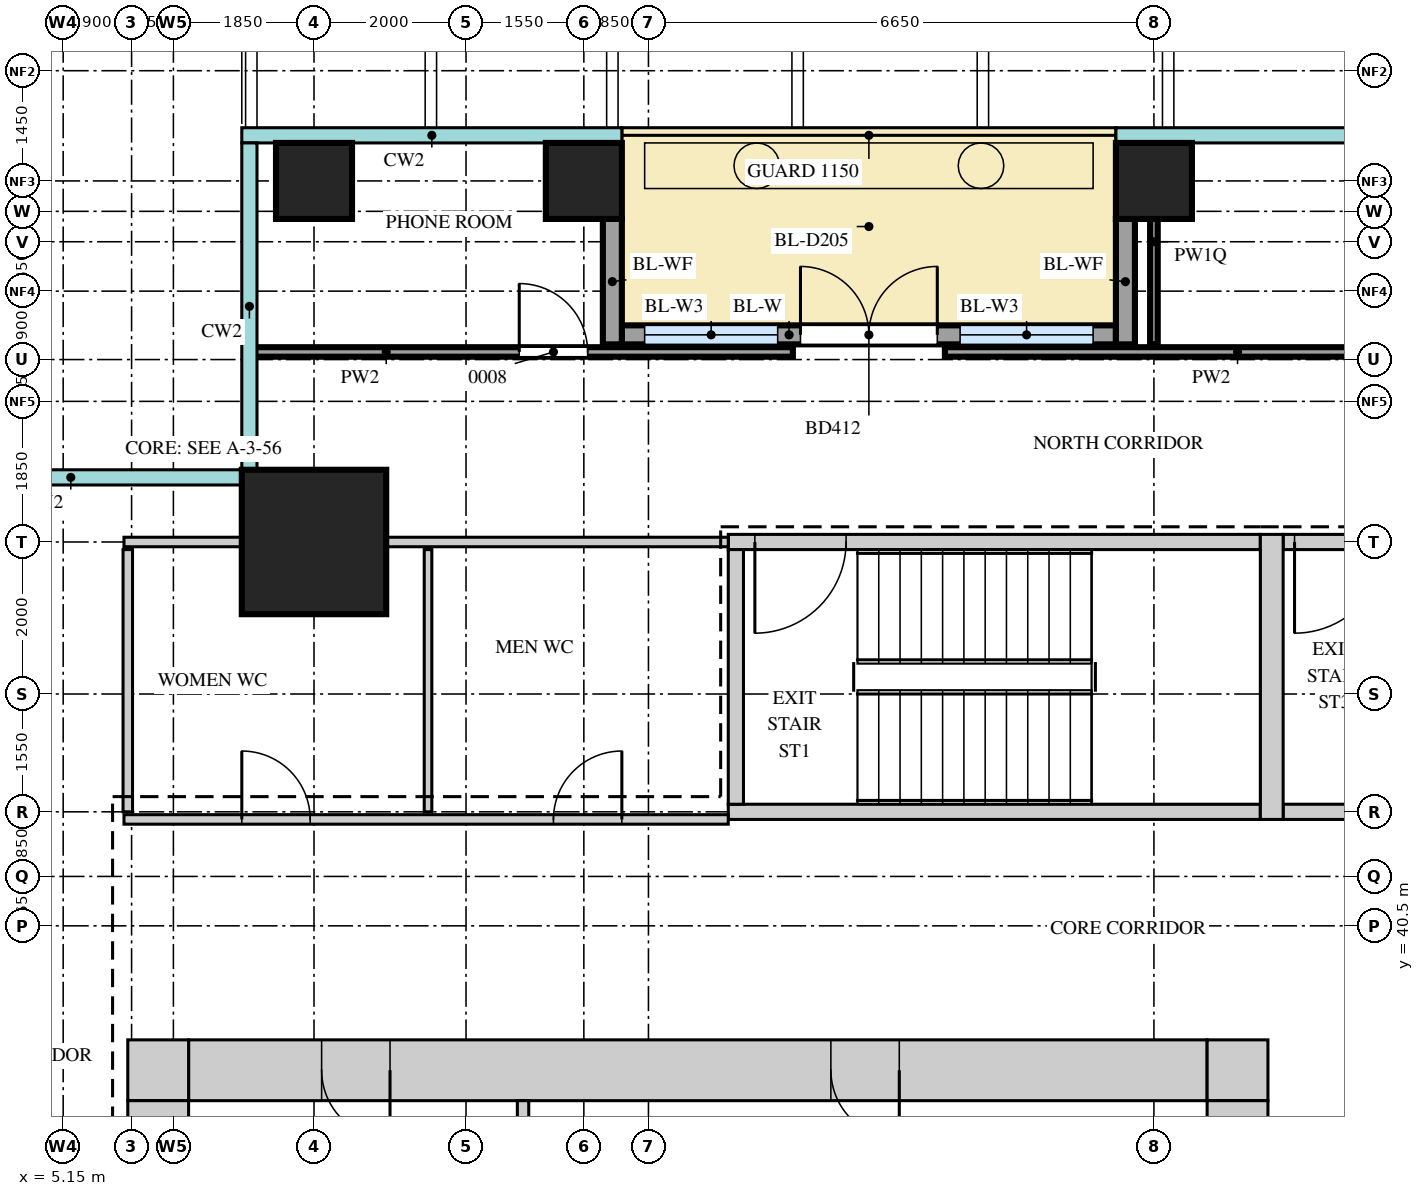
"""IFC4 building model, lengths in metres.
Left out: names, types, materials, properties, quantities, classifications, styles, units other than length and angle.
Written with IfcOpenShell. Run it as: python <this file> out.ifc"""

import sys

from ifc_helpers import new_model, si_unit, direction, frame, frame_2d, origin, origin_2d, place, context, subcontext, project, spatial, rectangle, extrude, source, transform, mapped, element, fill, save


model = new_model("IFC4")
c1 = context("Model", 3, precision=1e-05, world=origin(), true_north=direction((0.0, 1.0)))
c2 = subcontext(c1, "Body", "Model", "MODEL_VIEW")
j1 = project(units=[si_unit("LENGTHUNIT", "METRE"), si_unit("PLANEANGLEUNIT", "RADIAN")], contexts=[c1])
p1 = place(None, origin())
s1 = spatial("IfcSite", under=j1, at=p1, CompositionType="ELEMENT")
p2 = place(p1, origin())
s2 = spatial("IfcBuilding", under=s1, at=p2, CompositionType="ELEMENT")
p3 = place(p2, frame((0.0, 0.0, 188.7)))
s3 = spatial("IfcBuildingStorey", under=s2, at=p3, CompositionType="ELEMENT", Elevation=188.7)
m1 = source(origin(), c2, "Body", "SweptSolid", [
    extrude(rectangle(XDim=13.4, YDim=0.8, at=frame_2d((6.7, 0.0))), origin(), (0.0, 0.0, 1.0), 3.75),
])
p4 = place(p3, frame((6.8, 38.6, 0.0), z_axis=(0.0, 0.0, 1.0), x_axis=(1.0, 0.0, 0.0)))
e1 = element("IfcWall", 1, at=p4, inside=s3, PredefinedType="SHEAR", context=c2, shape_type="MappedRepresentation", body=[
    mapped(m1, transform((0.0, 0.0, 0.0))),
])
m2 = source(origin(), c2, "Body", "SweptSolid", [
    extrude(rectangle(XDim=0.9, YDim=2.1, at=frame_2d((0.45, 1.05))), frame((0.0, 0.41, 0.0), z_axis=(0.0, -1.0, 0.0), x_axis=(1.0, 0.0, 0.0)), (0.0, 0.0, 1.0), 0.82),
])
p5 = place(p4, frame((1.75, 0.0, 0.0)))
e2 = element("IfcOpeningElement", 2, at=p5, cuts=e1, PredefinedType="OPENING", context=c2, shape_type="MappedRepresentation", body=[
    mapped(m2, transform((0.0, 0.0, 0.0))),
])
p6 = place(p4, frame((8.45, 0.0, 0.0)))
e3 = element("IfcOpeningElement", 3, at=p6, cuts=e1, PredefinedType="OPENING", context=c2, shape_type="MappedRepresentation", body=[
    mapped(m2, transform((0.0, 0.0, 0.0))),
])
m3 = source(origin(), c2, "Body", "SweptSolid", [
    extrude(rectangle(XDim=0.8, YDim=0.8, at=frame_2d((0.4, 0.0))), origin(), (0.0, 0.0, 1.0), 3.75),
])
for number, where, z_axis, x_axis in (
    (4, (20.2, 38.6, 0.0), (0.0, 0.0, 1.0), (1.0, 0.0, 0.0)),
    (5, (6.0, 38.6, 0.0), (0.0, 0.0, 1.0), (1.0, 0.0, 0.0)),
):
    element("IfcWall", number, at=place(p3, frame(where, z_axis=z_axis, x_axis=x_axis)), inside=s3, PredefinedType="SHEAR", context=c2, shape_type="MappedRepresentation", body=[
        mapped(m3, transform((0.0, 0.0, 0.0))),
    ])
m4 = source(origin(), c2, "Body", "SweptSolid", [
    extrude(rectangle(XDim=22.4, YDim=0.8, at=frame_2d((11.2, 0.0))), origin(), (0.0, 0.0, 1.0), 3.75),
])
p7 = place(p3, frame((20.6, 15.8, 0.0), z_axis=(0.0, 0.0, 1.0), x_axis=(0.0, 1.0, 0.0)))
e6 = element("IfcWall", 6, at=p7, inside=s3, PredefinedType="SHEAR", context=c2, shape_type="MappedRepresentation", body=[
    mapped(m4, transform((0.0, 0.0, 0.0))),
])
m5 = source(origin(), c2, "Body", "SweptSolid", [
    extrude(rectangle(XDim=1.8, YDim=2.1, at=frame_2d((0.9, 1.05))), frame((0.0, 0.41, 0.0), z_axis=(0.0, -1.0, 0.0), x_axis=(1.0, 0.0, 0.0)), (0.0, 0.0, 1.0), 0.82),
])
p8 = place(p7, frame((10.7, 0.0, 0.0)))
e7 = element("IfcOpeningElement", 7, at=p8, cuts=e6, PredefinedType="OPENING", context=c2, shape_type="MappedRepresentation", body=[
    mapped(m5, transform((0.0, 0.0, 0.0))),
])
p9 = place(p7, frame((0.35, 0.0, 0.0)))
e8 = element("IfcOpeningElement", 8, at=p9, cuts=e6, PredefinedType="OPENING", context=c2, shape_type="MappedRepresentation", body=[
    mapped(m2, transform((0.0, 0.0, 0.0))),
])
p10 = place(p7, frame((2.15, 0.0, 0.0)))
e9 = element("IfcOpeningElement", 9, at=p10, cuts=e6, PredefinedType="OPENING", context=c2, shape_type="MappedRepresentation", body=[
    mapped(m2, transform((0.0, 0.0, 0.0))),
])
m6 = source(origin(), c2, "Body", "SweptSolid", [
    extrude(rectangle(XDim=1.0, YDim=2.1, at=frame_2d((0.5, 1.05))), frame((0.0, 0.41, 0.0), z_axis=(0.0, -1.0, 0.0), x_axis=(1.0, 0.0, 0.0)), (0.0, 0.0, 1.0), 0.82),
])
p11 = place(p7, frame((4.85, 0.0, 0.0)))
e10 = element("IfcOpeningElement", 10, at=p11, cuts=e6, PredefinedType="OPENING", context=c2, shape_type="MappedRepresentation", body=[
    mapped(m6, transform((0.0, 0.0, 0.0))),
])
p12 = place(p3, frame((6.4, 15.8, 0.0), z_axis=(0.0, 0.0, 1.0), x_axis=(0.0, 1.0, 0.0)))
e11 = element("IfcWall", 11, at=p12, inside=s3, PredefinedType="SHEAR", context=c2, shape_type="MappedRepresentation", body=[
    mapped(m4, transform((0.0, 0.0, 0.0))),
])
m7 = source(origin(), c2, "Body", "SweptSolid", [
    extrude(rectangle(XDim=7.0, YDim=0.2, at=frame_2d((3.5, 0.0))), origin(), (0.0, 0.0, 1.0), 3.75),
])
p13 = place(p3, frame((13.9, 45.55, 0.0), z_axis=(0.0, 0.0, 1.0), x_axis=(1.0, 0.0, 0.0)))
e12 = element("IfcWall", 12, at=p13, inside=s3, PredefinedType="SHEAR", context=c2, shape_type="MappedRepresentation", body=[
    mapped(m7, transform((0.0, 0.0, 0.0))),
])
m8 = source(origin(), c2, "Body", "SweptSolid", [
    extrude(rectangle(XDim=1.2, YDim=2.1, at=frame_2d((0.6, 1.05))), frame((0.0, 0.11, 0.0), z_axis=(0.0, -1.0, 0.0), x_axis=(1.0, 0.0, 0.0)), (0.0, 0.0, 1.0), 0.22),
])
p14 = place(p13, frame((0.35, 0.0, 0.0)))
e13 = element("IfcOpeningElement", 13, at=p14, cuts=e12, PredefinedType="OPENING", context=c2, shape_type="MappedRepresentation", body=[
    mapped(m8, transform((0.0, 0.0, 0.0))),
])
p15 = place(p3, frame((13.9, 42.0, 0.0), z_axis=(0.0, 0.0, 1.0), x_axis=(1.0, 0.0, 0.0)))
e14 = element("IfcWall", 14, at=p15, inside=s3, PredefinedType="SHEAR", context=c2, shape_type="MappedRepresentation", body=[
    mapped(m7, transform((0.0, 0.0, 0.0))),
])
m9 = source(origin(), c2, "Body", "SweptSolid", [
    extrude(rectangle(XDim=7.1, YDim=0.2, at=frame_2d((3.55, 0.0))), origin(), (0.0, 0.0, 1.0), 3.75),
])
p16 = place(p3, frame((21.2, 45.55, 0.0), z_axis=(0.0, 0.0, 1.0), x_axis=(1.0, 0.0, 0.0)))
e15 = element("IfcWall", 15, at=p16, inside=s3, PredefinedType="SHEAR", context=c2, shape_type="MappedRepresentation", body=[
    mapped(m9, transform((0.0, 0.0, 0.0))),
])
p17 = place(p16, frame((0.15, 0.0, 0.0)))
e16 = element("IfcOpeningElement", 16, at=p17, cuts=e15, PredefinedType="OPENING", context=c2, shape_type="MappedRepresentation", body=[
    mapped(m8, transform((0.0, 0.0, 0.0))),
])
p18 = place(p3, frame((21.2, 42.0, 0.0), z_axis=(0.0, 0.0, 1.0), x_axis=(1.0, 0.0, 0.0)))
e17 = element("IfcWall", 17, at=p18, inside=s3, PredefinedType="SHEAR", context=c2, shape_type="MappedRepresentation", body=[
    mapped(m9, transform((0.0, 0.0, 0.0))),
])
m10 = source(origin(), c2, "Body", "SweptSolid", [
    extrude(rectangle(XDim=3.75, YDim=0.3, at=frame_2d((1.875, 0.0))), origin(), (0.0, 0.0, 1.0), 3.75),
])
p19 = place(p3, frame((21.05, 41.9, 0.0), z_axis=(0.0, 0.0, 1.0), x_axis=(0.0, 1.0, 0.0)))
e18 = element("IfcWall", 18, at=p19, inside=s3, PredefinedType="SHEAR", context=c2, shape_type="MappedRepresentation", body=[
    mapped(m10, transform((0.0, 0.0, 0.0))),
])
m11 = source(origin(), c2, "Body", "SweptSolid", [
    extrude(rectangle(XDim=3.35, YDim=0.2, at=frame_2d((1.675, 0.0))), origin(), (0.0, 0.0, 1.0), 3.75),
])
p20 = place(p3, frame((14.0, 42.1, 0.0), z_axis=(0.0, 0.0, 1.0), x_axis=(0.0, 1.0, 0.0)))
e19 = element("IfcWall", 19, at=p20, inside=s3, PredefinedType="SHEAR", context=c2, shape_type="MappedRepresentation", body=[
    mapped(m11, transform((0.0, 0.0, 0.0))),
])
m12 = source(origin(), c2, "Body", "SweptSolid", [
    extrude(rectangle(XDim=1.9, YDim=1.9, at=origin_2d()), origin(), (0.0, 0.0, 1.0), 4.0),
])
p21 = place(p3, frame((8.45, 45.55, 0.0), z_axis=(0.0, 0.0, 1.0), x_axis=(1.0, 0.0, 0.0)))
e20 = element("IfcColumn", 20, at=p21, inside=s3, PredefinedType="COLUMN", context=c2, shape_type="MappedRepresentation", body=[
    mapped(m12, transform((0.0, 0.0, 0.0))),
])
m13 = source(origin(), c2, "Body", "SweptSolid", [
    extrude(rectangle(XDim=1.0, YDim=1.0, at=origin_2d()), origin(), (0.0, 0.0, 1.0), 3.75),
])
for number, where, z_axis, x_axis in (
    (21, (8.45, 50.3, 0.0), (0.0, 0.0, 1.0), (1.0, 0.0, 0.0)),
    (22, (12.0, 50.3, 0.0), (0.0, 0.0, 1.0), (1.0, 0.0, 0.0)),
    (23, (19.5, 50.3, 0.0), (0.0, 0.0, 1.0), (1.0, 0.0, 0.0)),
):
    element("IfcColumn", number, at=place(p3, frame(where, z_axis=z_axis, x_axis=x_axis)), inside=s3, PredefinedType="COLUMN", context=c2, shape_type="MappedRepresentation", body=[
        mapped(m13, transform((0.0, 0.0, 0.0))),
    ])
m14 = source(origin(), c2, "Body", "SweptSolid", [
    extrude(rectangle(XDim=6.5, YDim=0.25, at=frame_2d((3.25, 0.0))), origin(), (0.0, 0.0, 1.0), 3.75),
])
p22 = place(p3, frame((12.5, 48.275, 0.0), z_axis=(0.0, 0.0, 1.0), x_axis=(1.0, 0.0, 0.0)))
e24 = element("IfcWall", 24, at=p22, inside=s3, PredefinedType="SOLIDWALL", context=c2, shape_type="MappedRepresentation", body=[
    mapped(m14, transform((0.0, 0.0, 0.0))),
])
m15 = source(origin(), c2, "Body", "SweptSolid", [
    extrude(rectangle(XDim=1.75, YDim=2.4, at=frame_2d((0.875, 1.2))), frame((0.0, 0.135, 0.0), z_axis=(0.0, -1.0, 0.0), x_axis=(1.0, 0.0, 0.0)), (0.0, 0.0, 1.0), 0.27),
])
p23 = place(p22, frame((0.3, 0.0, 0.0)))
e25 = element("IfcOpeningElement", 25, at=p23, cuts=e24, PredefinedType="OPENING", context=c2, shape_type="MappedRepresentation", body=[
    mapped(m15, transform((0.0, 0.0, 0.0))),
])
p24 = place(p22, frame((4.45, 0.0, 0.0)))
e26 = element("IfcOpeningElement", 26, at=p24, cuts=e24, PredefinedType="OPENING", context=c2, shape_type="MappedRepresentation", body=[
    mapped(m15, transform((0.0, 0.0, 0.0))),
])
m16 = source(origin(), c2, "Body", "SweptSolid", [
    extrude(rectangle(XDim=1.8, YDim=2.4, at=frame_2d((0.9, 1.2))), frame((0.0, 0.135, 0.0), z_axis=(0.0, -1.0, 0.0), x_axis=(1.0, 0.0, 0.0)), (0.0, 0.0, 1.0), 0.27),
])
p25 = place(p22, frame((2.35, 0.0, 0.0)))
e27 = element("IfcOpeningElement", 27, at=p25, cuts=e24, PredefinedType="OPENING", context=c2, shape_type="MappedRepresentation", body=[
    mapped(m16, transform((0.0, 0.0, 0.0))),
])
m17 = source(origin(), c2, "Body", "SweptSolid", [
    extrude(rectangle(XDim=1.65, YDim=0.25, at=frame_2d((0.825, 0.0))), origin(), (0.0, 0.0, 1.0), 3.45),
])
for number, where, z_axis, x_axis in (
    (28, (12.375, 49.8, 0.0), (0.0, 0.0, 1.0), (0.0, -1.0, 0.0)),
    (29, (19.125, 49.8, 0.0), (0.0, 0.0, 1.0), (0.0, -1.0, 0.0)),
):
    element("IfcWall", number, at=place(p3, frame(where, z_axis=z_axis, x_axis=x_axis)), inside=s3, PredefinedType="SOLIDWALL", context=c2, shape_type="MappedRepresentation", body=[
        mapped(m17, transform((0.0, 0.0, 0.0))),
    ])
m18 = source(origin(), c2, "Body", "SweptSolid", [
    extrude(rectangle(XDim=6.0, YDim=0.15, at=frame_2d((3.0, 0.0))), origin(), (0.0, 0.0, 1.0), 3.8),
])
p26 = place(p3, frame((11.2, 32.2, 0.0), z_axis=(0.0, 0.0, 1.0), x_axis=(0.0, 1.0, 0.0)))
e30 = element("IfcWall", 30, at=p26, inside=s3, PredefinedType="PARTITIONING", context=c2, shape_type="MappedRepresentation", body=[
    mapped(m18, transform((0.0, 0.0, 0.0))),
])
m19 = source(origin(), c2, "Body", "SweptSolid", [
    extrude(rectangle(XDim=7.95, YDim=0.125, at=frame_2d((3.975, 0.0))), origin(), (0.0, 0.0, 1.0), 3.8),
])
p27 = place(p3, frame((5.95, 41.9, 0.0), z_axis=(0.0, 0.0, 1.0), x_axis=(1.0, 0.0, 0.0)))
e31 = element("IfcWall", 31, at=p27, inside=s3, PredefinedType="PARTITIONING", context=c2, shape_type="MappedRepresentation", body=[
    mapped(m19, transform((0.0, 0.0, 0.0))),
])
m20 = source(origin(), c2, "Body", "SweptSolid", [
    extrude(rectangle(XDim=0.9, YDim=2.1, at=frame_2d((0.45, 1.05))), frame((0.0, 0.073, 0.0), z_axis=(0.0, -1.0, 0.0), x_axis=(1.0, 0.0, 0.0)), (0.0, 0.0, 1.0), 0.145),
])
p28 = place(p27, frame((1.55, 0.0, 0.0)))
e32 = element("IfcOpeningElement", 32, at=p28, cuts=e31, PredefinedType="OPENING", context=c2, shape_type="MappedRepresentation", body=[
    mapped(m20, transform((0.0, 0.0, 0.0))),
])
p29 = place(p27, frame((5.65, 0.0, 0.0)))
e33 = element("IfcOpeningElement", 33, at=p29, cuts=e31, PredefinedType="OPENING", context=c2, shape_type="MappedRepresentation", body=[
    mapped(m20, transform((0.0, 0.0, 0.0))),
])
m21 = source(origin(), c2, "Body", "SweptSolid", [
    extrude(rectangle(XDim=3.45, YDim=0.125, at=frame_2d((1.725, 0.0))), origin(), (0.0, 0.0, 1.0), 3.8),
])
p30 = place(p3, frame((6.0, 42.0, 0.0), z_axis=(0.0, 0.0, 1.0), x_axis=(0.0, 1.0, 0.0)))
e34 = element("IfcWall", 34, at=p30, inside=s3, PredefinedType="PARTITIONING", context=c2, shape_type="MappedRepresentation", body=[
    mapped(m21, transform((0.0, 0.0, 0.0))),
])
m22 = source(origin(), c2, "Body", "SweptSolid", [
    extrude(rectangle(XDim=3.45, YDim=0.1, at=frame_2d((1.725, 0.0))), origin(), (0.0, 0.0, 1.0), 3.8),
])
p31 = place(p3, frame((9.95, 42.0, 0.0), z_axis=(0.0, 0.0, 1.0), x_axis=(0.0, 1.0, 0.0)))
e35 = element("IfcWall", 35, at=p31, inside=s3, PredefinedType="PARTITIONING", context=c2, shape_type="MappedRepresentation", body=[
    mapped(m22, transform((0.0, 0.0, 0.0))),
])
m23 = source(origin(), c2, "Body", "SweptSolid", [
    extrude(rectangle(XDim=7.95, YDim=0.125, at=frame_2d((3.975, 0.0))), origin(), (0.0, 0.0, 1.0), 3.25),
])
p32 = place(p3, frame((5.95, 45.55, 0.0), z_axis=(0.0, 0.0, 1.0), x_axis=(1.0, 0.0, 0.0)))
e36 = element("IfcWall", 36, at=p32, inside=s3, PredefinedType="PARTITIONING", context=c2, shape_type="MappedRepresentation", body=[
    mapped(m23, transform((0.0, 0.0, 0.0))),
])
m24 = source(origin(), c2, "Body", "SweptSolid", [
    extrude(rectangle(XDim=2.7, YDim=0.1, at=frame_2d((1.35, 0.0))), origin(), (0.0, 0.0, 1.0), 3.42),
])
p33 = place(p3, frame((19.5, 48.15, 0.0), z_axis=(0.0, 0.0, 1.0), x_axis=(0.0, 1.0, 0.0)))
e37 = element("IfcWall", 37, at=p33, inside=s3, PredefinedType="PARTITIONING", context=c2, shape_type="MappedRepresentation", body=[
    mapped(m24, transform((0.0, 0.0, 0.0))),
])
m25 = source(origin(), c2, "Body", "SweptSolid", [
    extrude(rectangle(XDim=7.1, YDim=0.125, at=frame_2d((3.55, 0.0))), origin(), (0.0, 0.0, 1.0), 3.8),
])
p34 = place(p3, frame((7.65, 48.05, 0.0), z_axis=(0.0, 0.0, 1.0), x_axis=(1.0, 0.0, 0.0)))
e38 = element("IfcWall", 38, at=p34, inside=s3, PredefinedType="PARTITIONING", context=c2, shape_type="MappedRepresentation", body=[
    mapped(m25, transform((0.0, 0.0, 0.0))),
])
p35 = place(p34, frame((3.5, 0.0, 0.0)))
e39 = element("IfcOpeningElement", 39, at=p35, cuts=e38, PredefinedType="OPENING", context=c2, shape_type="MappedRepresentation", body=[
    mapped(m20, transform((0.0, 0.0, 0.0))),
])
m26 = source(origin(), c2, "Body", "SweptSolid", [
    extrude(rectangle(XDim=13.9, YDim=0.125, at=frame_2d((6.95, 0.0))), origin(), (0.0, 0.0, 1.0), 3.8),
])
p36 = place(p3, frame((16.75, 48.05, 0.0), z_axis=(0.0, 0.0, 1.0), x_axis=(1.0, 0.0, 0.0)))
e40 = element("IfcWall", 40, at=p36, inside=s3, PredefinedType="PARTITIONING", context=c2, shape_type="MappedRepresentation", body=[
    mapped(m26, transform((0.0, 0.0, 0.0))),
])
p37 = place(p36, frame((7.7, 0.0, 0.0)))
e41 = element("IfcOpeningElement", 41, at=p37, cuts=e40, PredefinedType="OPENING", context=c2, shape_type="MappedRepresentation", body=[
    mapped(m20, transform((0.0, 0.0, 0.0))),
])
m27 = source(origin(), c2, "Body", "SweptSolid", [
    extrude(rectangle(XDim=1.75, YDim=2.4, at=frame_2d((0.875, 1.2))), frame((0.0, 0.03, 0.0), z_axis=(0.0, -1.0, 0.0), x_axis=(1.0, 0.0, 0.0)), (0.0, 0.0, 1.0), 0.06),
])
p38 = place(p23, origin())
e42 = element("IfcWindow", 42, at=p38, inside=s3, PartitioningType="SINGLE_PANEL", PredefinedType="WINDOW", context=c2, shape_type="MappedRepresentation", body=[
    mapped(m27, transform((0.0, 0.0, 0.0))),
])
fill(e25, e42)
p39 = place(p24, origin())
e43 = element("IfcWindow", 43, at=p39, inside=s3, PartitioningType="SINGLE_PANEL", PredefinedType="WINDOW", context=c2, shape_type="MappedRepresentation", body=[
    mapped(m27, transform((0.0, 0.0, 0.0))),
])
fill(e26, e43)
m28 = source(origin(), c2, "Body", "SweptSolid", [
    extrude(rectangle(XDim=1.8, YDim=2.4, at=frame_2d((0.9, 1.2))), frame((0.0, 0.025, 0.0), z_axis=(0.0, -1.0, 0.0), x_axis=(1.0, 0.0, 0.0)), (0.0, 0.0, 1.0), 0.05),
])
p40 = place(p25, origin())
e44 = element("IfcDoor", 44, at=p40, inside=s3, OperationType="DOUBLE_DOOR_DOUBLE_SWING", PredefinedType="DOOR", context=c2, shape_type="MappedRepresentation", body=[
    mapped(m28, transform((0.0, 0.0, 0.0))),
])
fill(e27, e44)
m29 = source(origin(), c2, "Body", "SweptSolid", [
    extrude(rectangle(XDim=0.9, YDim=2.1, at=frame_2d((0.45, 1.05))), frame((0.0, 0.35, 0.0), z_axis=(0.0, -1.0, 0.0), x_axis=(1.0, 0.0, 0.0)), (0.0, 0.0, 1.0), 0.7),
])
p41 = place(p5, origin())
e45 = element("IfcDoor", 45, at=p41, inside=s3, OperationType="SINGLE_SWING_RIGHT", PredefinedType="DOOR", context=c2, shape_type="MappedRepresentation", body=[
    mapped(m29, transform((0.0, 0.0, 0.0))),
])
fill(e2, e45)
p42 = place(p6, origin())
e46 = element("IfcDoor", 46, at=p42, inside=s3, OperationType="SINGLE_SWING_RIGHT", PredefinedType="DOOR", context=c2, shape_type="MappedRepresentation", body=[
    mapped(m29, transform((0.0, 0.0, 0.0))),
])
fill(e3, e46)
m30 = source(origin(), c2, "Body", "SweptSolid", [
    extrude(rectangle(XDim=0.9, YDim=2.1, at=frame_2d((0.45, 1.05))), frame((0.0, 0.025, 0.0), z_axis=(0.0, -1.0, 0.0), x_axis=(1.0, 0.0, 0.0)), (0.0, 0.0, 1.0), 0.05),
])
p43 = place(p28, origin())
e47 = element("IfcDoor", 47, at=p43, inside=s3, OperationType="SINGLE_SWING_RIGHT", PredefinedType="DOOR", context=c2, shape_type="MappedRepresentation", body=[
    mapped(m30, transform((0.0, 0.0, 0.0))),
])
fill(e32, e47)
p44 = place(p29, origin())
e48 = element("IfcDoor", 48, at=p44, inside=s3, OperationType="SINGLE_SWING_LEFT", PredefinedType="DOOR", context=c2, shape_type="MappedRepresentation", body=[
    mapped(m30, transform((0.0, 0.0, 0.0))),
])
fill(e33, e48)
p45 = place(p35, origin())
e49 = element("IfcDoor", 49, at=p45, inside=s3, OperationType="SINGLE_SWING_RIGHT", PredefinedType="DOOR", context=c2, shape_type="MappedRepresentation", body=[
    mapped(m30, transform((0.0, 0.0, 0.0))),
])
fill(e39, e49)
m31 = source(origin(), c2, "Body", "SweptSolid", [
    extrude(rectangle(XDim=1.2, YDim=2.1, at=frame_2d((0.6, 1.05))), frame((0.0, 0.025, 0.0), z_axis=(0.0, -1.0, 0.0), x_axis=(1.0, 0.0, 0.0)), (0.0, 0.0, 1.0), 0.05),
])
p46 = place(p14, origin())
e50 = element("IfcDoor", 50, at=p46, inside=s3, OperationType="SINGLE_SWING_LEFT", PredefinedType="DOOR", context=c2, shape_type="MappedRepresentation", body=[
    mapped(m31, transform((0.0, 0.0, 0.0))),
])
fill(e13, e50)
p47 = place(p17, origin())
e51 = element("IfcDoor", 51, at=p47, inside=s3, OperationType="SINGLE_SWING_LEFT", PredefinedType="DOOR", context=c2, shape_type="MappedRepresentation", body=[
    mapped(m31, transform((0.0, 0.0, 0.0))),
])
fill(e16, e51)
save(model, sys.argv[1])
